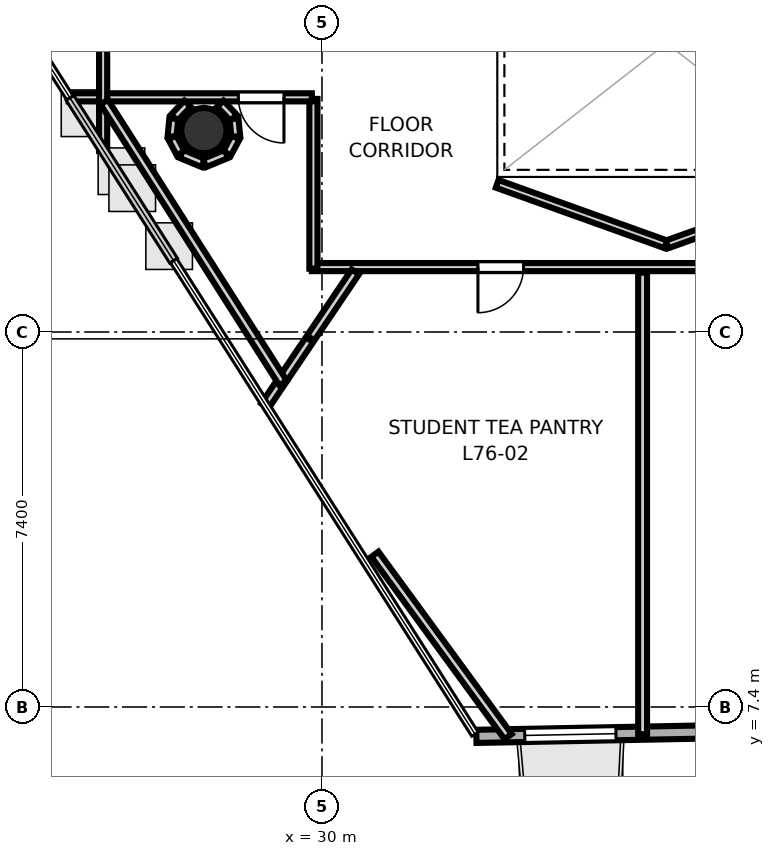
"""IFC4 building model, lengths in metres.
Left out: names, types, materials, properties, quantities, classifications, styles, units other than length and angle.
Written with IfcOpenShell. Run it as: python <this file> out.ifc"""

import sys

from ifc_helpers import new_model, si_unit, direction, frame, frame_2d, origin, origin_2d, place, context, subcontext, project, spatial, rectangle, hollow_circle, extrude, element, fill, save


model = new_model("IFC4")
c1 = context("Model", 3, precision=1e-05, world=origin(), true_north=direction((0.0, 1.0)))
c2 = subcontext(c1, "Body", "Model", "MODEL_VIEW")
j1 = project(units=[si_unit("LENGTHUNIT", "METRE"), si_unit("PLANEANGLEUNIT", "RADIAN")], contexts=[c1])
p1 = place(None, origin())
s1 = spatial("IfcSite", under=j1, at=p1, CompositionType="ELEMENT")
p2 = place(p1, origin())
s2 = spatial("IfcBuilding", under=s1, at=p2, CompositionType="ELEMENT")
p3 = place(p2, frame((0.0, 0.0, 295.4)))
s3 = spatial("IfcBuildingStorey", under=s2, at=p3, CompositionType="ELEMENT", Elevation=295.4)
p4 = place(p3, frame((27.67, 18.774, 0.0), z_axis=(0.0, 0.0, 1.0), x_axis=(1.0, 0.0, 0.0)))
e1 = element("IfcColumn", 1, at=p4, inside=s3, PredefinedType="COLUMN", context=c2, shape_type="SweptSolid", body=[
    extrude(hollow_circle(Radius=0.45, WallThickness=0.025, at=origin_2d()), origin(), (0.0, 0.0, 1.0), 3.7),
])
p5 = place(p3, frame((33.047, 6.82, 0.0), z_axis=(0.0, 0.0, 1.0), x_axis=(0.999816998349, 0.019130337478, 0.0)))
e2 = element("IfcWall", 2, at=p5, inside=s3, PredefinedType="SOLIDWALL", context=c2, shape_type="SweptSolid", body=[
    extrude(rectangle(XDim=4.99, YDim=0.26, at=frame_2d((2.495, 0.0))), origin(), (0.0, 0.0, 1.0), 3.52),
])
p6 = place(p5, frame((0.955, 0.0, 0.85)))
e3 = element("IfcOpeningElement", 3, at=p6, cuts=e2, PredefinedType="OPENING", context=c2, shape_type="SweptSolid", body=[
    extrude(rectangle(XDim=1.8, YDim=2.1, at=frame_2d((0.9, 1.05))), frame((0.0, 0.14, 0.0), z_axis=(0.0, -1.0, 0.0), x_axis=(1.0, 0.0, 0.0)), (0.0, 0.0, 1.0), 0.28),
])
p7 = place(p3, frame((33.458, 17.724, 0.0), z_axis=(0.0, 0.0, 1.0), x_axis=(0.94128854789, -0.337603124408, 0.0)))
e4 = element("IfcWall", 4, at=p7, inside=s3, PredefinedType="PARTITIONING", context=c2, shape_type="SweptSolid", body=[
    extrude(rectangle(XDim=3.54, YDim=0.16, at=frame_2d((1.77, 0.0))), origin(), (0.0, 0.0, 1.0), 2.84),
])
p8 = place(p3, frame((36.81, 16.529, 0.0), z_axis=(0.0, 0.0, 1.0), x_axis=(0.941548344365, 0.33687789364, 0.0)))
e5 = element("IfcWall", 5, at=p8, inside=s3, PredefinedType="PARTITIONING", context=c2, shape_type="SweptSolid", body=[
    extrude(rectangle(XDim=3.513, YDim=0.16, at=frame_2d((1.756, 0.0))), origin(), (0.0, 0.0, 1.0), 2.84),
])
p9 = place(p3, frame((44.046, 16.081, 0.0), z_axis=(0.0, 0.0, 1.0), x_axis=(-1.0, 0.0, 0.0)))
e6 = element("IfcWall", 6, at=p9, inside=s3, PredefinedType="PARTITIONING", context=c2, shape_type="SweptSolid", body=[
    extrude(rectangle(XDim=14.246, YDim=0.16, at=frame_2d((7.123, 0.0))), origin(), (0.0, 0.0, 1.0), 2.84),
])
p10 = place(p9, frame((10.069, 0.0, 0.0)))
e7 = element("IfcOpeningElement", 7, at=p10, cuts=e6, PredefinedType="OPENING", context=c2, shape_type="SweptSolid", body=[
    extrude(rectangle(XDim=0.9, YDim=2.1, at=frame_2d((0.45, 1.05))), frame((0.0, 0.09, 0.0), z_axis=(0.0, -1.0, 0.0), x_axis=(1.0, 0.0, 0.0)), (0.0, 0.0, 1.0), 0.18),
])
p11 = place(p3, frame((29.831, 16.05, 0.0), z_axis=(0.0, 0.0, 1.0), x_axis=(0.0, 1.0, 0.0)))
e8 = element("IfcWall", 8, at=p11, inside=s3, PredefinedType="PARTITIONING", context=c2, shape_type="SweptSolid", body=[
    extrude(rectangle(XDim=3.35, YDim=0.16, at=frame_2d((1.675, 0.0))), origin(), (0.0, 0.0, 1.0), 2.84),
])
p12 = place(p3, frame((29.8, 19.431, 0.0), z_axis=(0.0, 0.0, 1.0), x_axis=(-1.0, 0.0, 0.0)))
e9 = element("IfcWall", 9, at=p12, inside=s3, PredefinedType="PARTITIONING", context=c2, shape_type="SweptSolid", body=[
    extrude(rectangle(XDim=4.801, YDim=0.16, at=frame_2d((2.4, 0.0))), origin(), (0.0, 0.0, 1.0), 2.84),
])
p13 = place(p12, frame((0.55, 0.0, 0.0)))
e10 = element("IfcOpeningElement", 10, at=p13, cuts=e9, PredefinedType="OPENING", context=c2, shape_type="SweptSolid", body=[
    extrude(rectangle(XDim=0.9, YDim=2.1, at=frame_2d((0.45, 1.05))), frame((0.0, 0.09, 0.0), z_axis=(0.0, -1.0, 0.0), x_axis=(1.0, 0.0, 0.0)), (0.0, 0.0, 1.0), 0.18),
])
p14 = place(p3, frame((25.681, 18.372, 0.0), z_axis=(0.0, 0.0, 1.0), x_axis=(0.0, 1.0, 0.0)))
e11 = element("IfcWall", 11, at=p14, inside=s3, PredefinedType="PARTITIONING", context=c2, shape_type="SweptSolid", body=[
    extrude(rectangle(XDim=14.178, YDim=0.16, at=frame_2d((7.089, 0.0))), origin(), (0.0, 0.0, 1.0), 2.84),
])
p15 = place(p14, frame((11.417, 0.0, 0.0)))
e12 = element("IfcOpeningElement", 12, at=p15, cuts=e11, PredefinedType="OPENING", context=c2, shape_type="SweptSolid", body=[
    extrude(rectangle(XDim=1.25, YDim=2.2, at=frame_2d((0.625, 1.1))), frame((0.0, 0.09, 0.0), z_axis=(0.0, -1.0, 0.0), x_axis=(1.0, 0.0, 0.0)), (0.0, 0.0, 1.0), 0.18),
])
p16 = place(p14, frame((5.215, 0.0, 0.0)))
e13 = element("IfcOpeningElement", 13, at=p16, cuts=e11, PredefinedType="OPENING", context=c2, shape_type="SweptSolid", body=[
    extrude(rectangle(XDim=1.25, YDim=2.2, at=frame_2d((0.625, 1.1))), frame((0.0, 0.09, 0.0), z_axis=(0.0, -1.0, 0.0), x_axis=(1.0, 0.0, 0.0)), (0.0, 0.0, 1.0), 0.18),
])
p17 = place(p3, frame((30.658, 15.987, 0.0), z_axis=(0.0, 0.0, 1.0), x_axis=(-0.559194255482, -0.82903666061, 0.0)))
e14 = element("IfcWall", 14, at=p17, inside=s3, PredefinedType="PLUMBINGWALL", context=c2, shape_type="SweptSolid", body=[
    extrude(rectangle(XDim=3.191, YDim=0.175, at=frame_2d((1.596, 0.0))), origin(), (0.0, 0.0, 1.0), 2.84),
])
p18 = place(p3, frame((29.231, 13.794, 0.0), z_axis=(0.0, 0.0, 1.0), x_axis=(-0.5370149386, 0.843572732916, 0.0)))
e15 = element("IfcWall", 15, at=p18, inside=s3, PredefinedType="PLUMBINGWALL", context=c2, shape_type="SweptSolid", body=[
    extrude(rectangle(XDim=6.57, YDim=0.175, at=frame_2d((3.285, 0.0))), origin(), (0.0, 0.0, 1.0), 2.095),
])
p19 = place(p3, frame((27.347, 19.306, 0.0), z_axis=(0.0, 0.0, 1.0), x_axis=(-0.68932010071, -0.724456899171, 0.0)))
e16 = element("IfcWall", 16, at=p19, inside=s3, PredefinedType="PLUMBINGWALL", context=c2, shape_type="SweptSolid", body=[
    extrude(rectangle(XDim=0.382, YDim=0.175, at=frame_2d((0.191, 0.0))), origin(), (0.0, 0.0, 1.0), 2.84),
])
p20 = place(p3, frame((27.076, 19.01, 0.0), z_axis=(0.0, 0.0, 1.0), x_axis=(-0.097865889817, -0.995199611942, 0.0)))
e17 = element("IfcWall", 17, at=p20, inside=s3, PredefinedType="PLUMBINGWALL", context=c2, shape_type="SweptSolid", body=[
    extrude(rectangle(XDim=0.354, YDim=0.175, at=frame_2d((0.177, 0.0))), origin(), (0.0, 0.0, 1.0), 2.095),
])
p21 = place(p3, frame((27.044, 18.64, 0.0), z_axis=(0.0, 0.0, 1.0), x_axis=(0.471053526925, -0.882104628019, 0.0)))
e18 = element("IfcWall", 18, at=p21, inside=s3, PredefinedType="PLUMBINGWALL", context=c2, shape_type="SweptSolid", body=[
    extrude(rectangle(XDim=0.354, YDim=0.175, at=frame_2d((0.177, 0.0))), origin(), (0.0, 0.0, 1.0), 2.095),
])
for number, where, z_axis, x_axis in (
    (19, (27.227, 18.314, 0.0), (0.0, 0.0, 1.0), (0.924, -0.382, 0.0)),
    (20, (27.682, 18.135, 0.0), (0.0, 0.0, 1.0), (0.924, 0.382, 0.0)),
):
    element("IfcWall", number, at=place(p3, frame(where, z_axis=z_axis, x_axis=x_axis)), inside=s3, PredefinedType="PLUMBINGWALL", context=c2, shape_type="SweptSolid", body=[
        extrude(rectangle(XDim=0.467, YDim=0.175, at=frame_2d((0.233, 0.0))), origin(), (0.0, 0.0, 1.0), 2.095),
    ])
p22 = place(p3, frame((28.129, 18.328, 0.0), z_axis=(0.0, 0.0, 1.0), x_axis=(0.471589913721, 0.881817981942, 0.0)))
e21 = element("IfcWall", 21, at=p22, inside=s3, PredefinedType="PLUMBINGWALL", context=c2, shape_type="SweptSolid", body=[
    extrude(rectangle(XDim=0.354, YDim=0.175, at=frame_2d((0.177, 0.0))), origin(), (0.0, 0.0, 1.0), 2.84),
])
p23 = place(p3, frame((28.299, 18.658, 0.0), z_axis=(0.0, 0.0, 1.0), x_axis=(-0.097865889817, 0.995199611942, 0.0)))
e22 = element("IfcWall", 22, at=p23, inside=s3, PredefinedType="PLUMBINGWALL", context=c2, shape_type="SweptSolid", body=[
    extrude(rectangle(XDim=0.354, YDim=0.175, at=frame_2d((0.177, 0.0))), origin(), (0.0, 0.0, 1.0), 2.84),
])
p24 = place(p3, frame((28.256, 19.029, 0.0), z_axis=(0.0, 0.0, 1.0), x_axis=(-0.68932010071, 0.724456899171, 0.0)))
e23 = element("IfcWall", 23, at=p24, inside=s3, PredefinedType="PLUMBINGWALL", context=c2, shape_type="SweptSolid", body=[
    extrude(rectangle(XDim=0.382, YDim=0.175, at=frame_2d((0.191, 0.0))), origin(), (0.0, 0.0, 1.0), 2.84),
])
p25 = place(p3, frame((36.328, 15.973, 0.0), z_axis=(0.0, 0.0, 1.0), x_axis=(0.0, -1.0, 0.0)))
e24 = element("IfcWall", 24, at=p25, inside=s3, PredefinedType="PLUMBINGWALL", context=c2, shape_type="SweptSolid", body=[
    extrude(rectangle(XDim=9.11, YDim=0.175, at=frame_2d((4.555, 0.0))), origin(), (0.0, 0.0, 1.0), 2.84),
])
p26 = place(p3, frame((33.674, 6.815, 0.0), z_axis=(0.0, 0.0, 1.0), x_axis=(-0.590016589342, 0.807391122258, 0.0)))
e25 = element("IfcWall", 25, at=p26, inside=s3, PredefinedType="PLUMBINGWALL", context=c2, shape_type="SweptSolid", body=[
    extrude(rectangle(XDim=4.458, YDim=0.175, at=frame_2d((2.229, 0.0))), origin(), (0.0, 0.0, 1.0), 2.84),
])
p27 = place(p13, origin())
e26 = element("IfcDoor", 26, at=p27, inside=s3, OperationType="SINGLE_SWING_LEFT", PredefinedType="DOOR", context=c2, shape_type="SweptSolid", body=[
    extrude(rectangle(XDim=0.9, YDim=2.1, at=frame_2d((0.45, 1.05))), frame((0.0, 0.025, 0.0), z_axis=(0.0, -1.0, 0.0), x_axis=(1.0, 0.0, 0.0)), (0.0, 0.0, 1.0), 0.05),
])
fill(e10, e26)
p28 = place(p10, origin())
e27 = element("IfcDoor", 27, at=p28, inside=s3, OperationType="SINGLE_SWING_RIGHT", PredefinedType="DOOR", context=c2, shape_type="SweptSolid", body=[
    extrude(rectangle(XDim=0.9, YDim=2.1, at=frame_2d((0.45, 1.05))), frame((0.0, 0.025, 0.0), z_axis=(0.0, -1.0, 0.0), x_axis=(1.0, 0.0, 0.0)), (0.0, 0.0, 1.0), 0.05),
])
fill(e7, e27)
p29 = place(p6, origin())
e28 = element("IfcWindow", 28, at=p29, inside=s3, PartitioningType="SINGLE_PANEL", PredefinedType="WINDOW", context=c2, shape_type="SweptSolid", body=[
    extrude(rectangle(XDim=1.8, YDim=2.1, at=frame_2d((0.9, 1.05))), frame((0.0, 0.03, 0.0), z_axis=(0.0, -1.0, 0.0), x_axis=(1.0, 0.0, 0.0)), (0.0, 0.0, 1.0), 0.06),
])
fill(e3, e28)
save(model, sys.argv[1])
